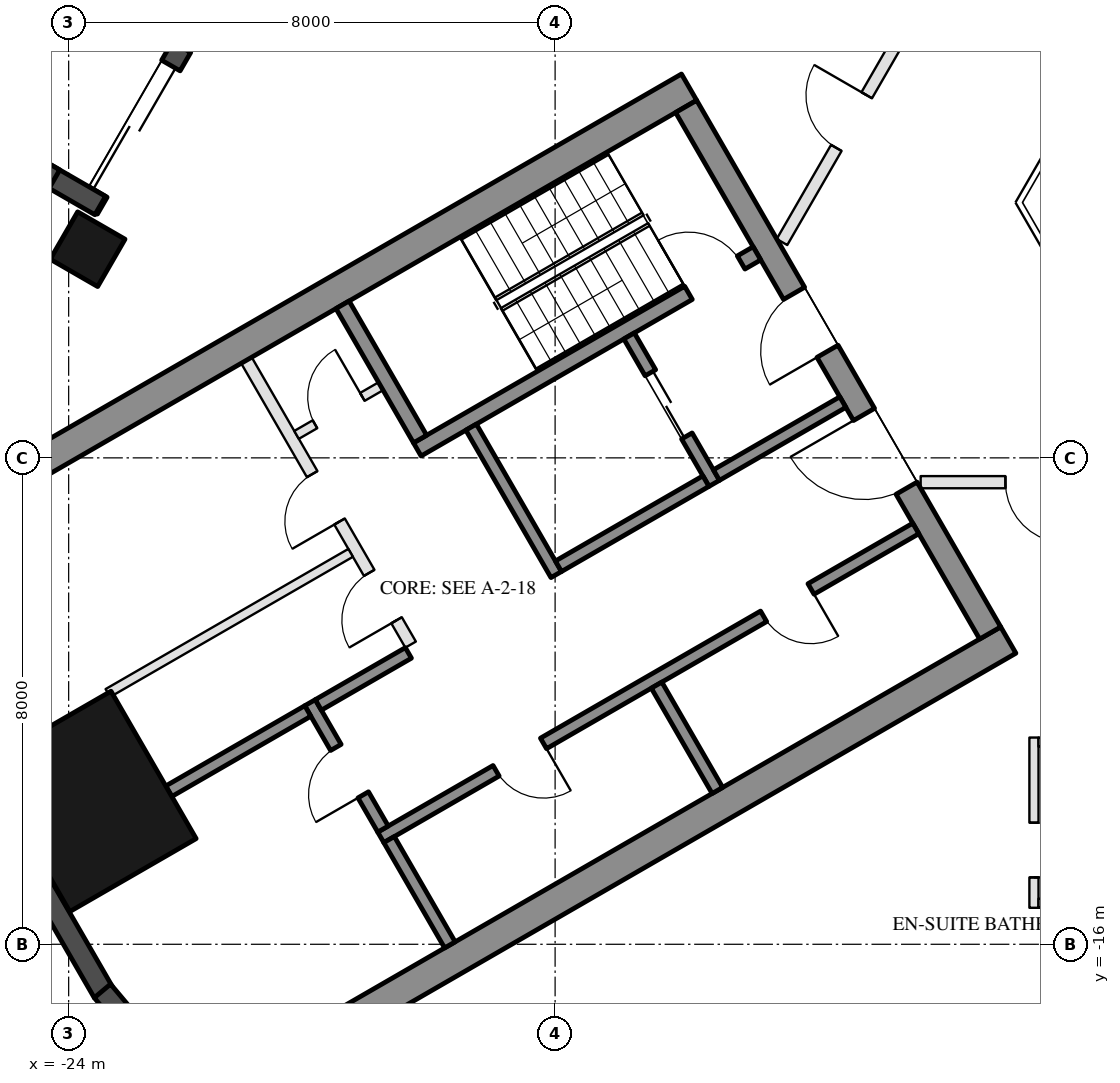
"""IFC4 building model, lengths in metres.
Left out: names, types, materials, properties, quantities, classifications, styles, units other than length and angle.
Written with IfcOpenShell. Run it as: python <this file> out.ifc"""

import sys

from ifc_helpers import new_model, si_unit, direction, frame, frame_2d, origin, origin_2d, place, context, subcontext, project, spatial, rectangle, hollow_rectangle, extrude, element, fill, save


model = new_model("IFC4")
c1 = context("Model", 3, precision=1e-05, world=origin(), true_north=direction((0.0, 1.0)))
c2 = subcontext(c1, "Body", "Model", "MODEL_VIEW")
j1 = project(units=[si_unit("LENGTHUNIT", "METRE"), si_unit("PLANEANGLEUNIT", "RADIAN")], contexts=[c1])
p1 = place(None, origin())
s1 = spatial("IfcSite", under=j1, at=p1, CompositionType="ELEMENT")
p2 = place(p1, origin())
s2 = spatial("IfcBuilding", under=s1, at=p2, CompositionType="ELEMENT")
p3 = place(p2, frame((0.0, 0.0, 87.2)))
s3 = spatial("IfcBuildingStorey", under=s2, at=p3, CompositionType="ELEMENT", Elevation=87.2)
p4 = place(p3, frame((-23.688, -4.568, 0.0), z_axis=(0.0, 0.0, 1.0), x_axis=(0.5, 0.866025403784, 0.0)))
e1 = element("IfcColumn", 1, at=p4, inside=s3, PredefinedType="COLUMN", context=c2, shape_type="SweptSolid", body=[
    extrude(hollow_rectangle(XDim=0.9, YDim=0.9, WallThickness=0.04, at=origin_2d()), origin(), (0.0, 0.0, 1.0), 3.7),
])
p5 = place(p3, frame((-23.643, -13.65, 0.0), z_axis=(0.0, 0.0, 1.0), x_axis=(-0.5, 0.866025403784, 0.0)))
e2 = element("IfcColumn", 2, at=p5, inside=s3, PredefinedType="COLUMN", context=c2, shape_type="SweptSolid", body=[
    extrude(hollow_rectangle(XDim=2.8, YDim=2.4, WallThickness=0.07, at=origin_2d()), origin(), (0.0, 0.0, 1.0), 3.7),
])
p6 = place(p3, frame((-20.309, 1.934, 0.0), z_axis=(0.0, 0.0, 1.0), x_axis=(-0.499992114976, -0.866029956157, 0.0)))
e3 = element("IfcWall", 3, at=p6, inside=s3, PredefinedType="SOLIDWALL", context=c2, shape_type="SweptSolid", body=[
    extrude(rectangle(XDim=6.74, YDim=0.35, at=frame_2d((3.37, 0.0))), origin(), (0.0, 0.0, 1.0), 3.55),
])
p7 = place(p6, frame((4.02, 0.0, 0.0)))
e4 = element("IfcOpeningElement", 4, at=p7, cuts=e3, PredefinedType="OPENING", context=c2, shape_type="SweptSolid", body=[
    extrude(rectangle(XDim=2.4, YDim=2.4, at=frame_2d((1.2, 1.2))), frame((0.0, 0.185, 0.0), z_axis=(0.0, -1.0, 0.0), x_axis=(1.0, 0.0, 0.0)), (0.0, 0.0, 1.0), 0.37),
])
p8 = place(p6, frame((0.77, 0.0, 0.3)))
e5 = element("IfcOpeningElement", 5, at=p8, cuts=e3, PredefinedType="OPENING", context=c2, shape_type="SweptSolid", body=[
    extrude(rectangle(XDim=2.9, YDim=2.65, at=frame_2d((1.45, 1.325))), frame((0.0, 0.185, 0.0), z_axis=(0.0, -1.0, 0.0), x_axis=(1.0, 0.0, 0.0)), (0.0, 0.0, 1.0), 0.37),
])
p9 = place(p3, frame((-23.481, -3.85, 0.0), z_axis=(0.0, 0.0, 1.0), x_axis=(-0.866092288191, 0.499884134912, 0.0)))
e6 = element("IfcWall", 6, at=p9, inside=s3, PredefinedType="SOLIDWALL", context=c2, shape_type="SweptSolid", body=[
    extrude(rectangle(XDim=1.22, YDim=0.35, at=frame_2d((0.61, 0.0))), origin(), (0.0, 0.0, 1.0), 3.55),
])
p10 = place(p3, frame((-24.299, -3.176, 0.0), z_axis=(0.0, 0.0, 1.0), x_axis=(-0.500028278809, -0.866009076391, 0.0)))
e7 = element("IfcWall", 7, at=p10, inside=s3, PredefinedType="SOLIDWALL", context=c2, shape_type="SweptSolid", body=[
    extrude(rectangle(XDim=3.916, YDim=0.35, at=frame_2d((1.958, 0.0))), origin(), (0.0, 0.0, 1.0), 3.55),
])
p11 = place(p10, frame((1.7, 0.0, 0.3)))
e8 = element("IfcOpeningElement", 8, at=p11, cuts=e7, PredefinedType="OPENING", context=c2, shape_type="SweptSolid", body=[
    extrude(rectangle(XDim=1.8, YDim=2.65, at=frame_2d((0.9, 1.325))), frame((0.0, 0.185, 0.0), z_axis=(0.0, -1.0, 0.0), x_axis=(1.0, 0.0, 0.0)), (0.0, 0.0, 1.0), 0.37),
])
p12 = place(p3, frame((-26.257, -11.893, 0.0), z_axis=(0.0, 0.0, 1.0), x_axis=(0.500018773155, -0.866014564827, 0.0)))
e9 = element("IfcWall", 9, at=p12, inside=s3, PredefinedType="SOLIDWALL", context=c2, shape_type="SweptSolid", body=[
    extrude(rectangle(XDim=5.658, YDim=0.35, at=frame_2d((2.829, 0.0))), origin(), (0.0, 0.0, 1.0), 3.55),
])
p13 = place(p3, frame((-23.445, -16.768, 0.0), z_axis=(0.0, 0.0, 1.0), x_axis=(0.642733291068, -0.76609001857, 0.0)))
e10 = element("IfcWall", 10, at=p13, inside=s3, PredefinedType="SOLIDWALL", context=c2, shape_type="SweptSolid", body=[
    extrude(rectangle(XDim=1.91, YDim=0.35, at=frame_2d((0.955, 0.0))), origin(), (0.0, 0.0, 1.0), 3.55),
])
for number, where, z_axis, x_axis in (
    (11, (-13.797, -1.903, 0.0), (0.0, 0.0, 1.0), (-0.866, -0.5, 0.0)),
    (12, (-8.547, -10.997, 0.0), (0.0, 0.0, 1.0), (-0.866, -0.5, 0.0)),
):
    element("IfcWall", number, at=place(p3, frame(where, z_axis=z_axis, x_axis=x_axis)), inside=s3, PredefinedType="SHEAR", context=c2, shape_type="SweptSolid", body=[
        extrude(rectangle(XDim=14.837, YDim=0.5, at=frame_2d((7.418, 0.0))), origin(), (0.0, 0.0, 1.0), 3.5),
    ])
p14 = place(p3, frame((-13.845, -2.22, 0.0), z_axis=(0.0, 0.0, 1.0), x_axis=(0.500004234368, -0.866022959057, 0.0)))
e13 = element("IfcWall", 13, at=p14, inside=s3, PredefinedType="SHEAR", context=c2, shape_type="SweptSolid", body=[
    extrude(rectangle(XDim=10.0, YDim=0.4, at=frame_2d((5.0, 0.0))), origin(), (0.0, 0.0, 1.0), 3.5),
])
p15 = place(p14, frame((3.55, 0.0, 0.0)))
e14 = element("IfcOpeningElement", 14, at=p15, cuts=e13, PredefinedType="OPENING", context=c2, shape_type="SweptSolid", body=[
    extrude(rectangle(XDim=1.1, YDim=2.1, at=frame_2d((0.55, 1.05))), frame((0.0, 0.21, 0.0), z_axis=(0.0, -1.0, 0.0), x_axis=(1.0, 0.0, 0.0)), (0.0, 0.0, 1.0), 0.42),
])
p16 = place(p14, frame((5.85, 0.0, 0.0)))
e15 = element("IfcOpeningElement", 15, at=p16, cuts=e13, PredefinedType="OPENING", context=c2, shape_type="SweptSolid", body=[
    extrude(rectangle(XDim=1.4, YDim=2.1, at=frame_2d((0.7, 1.05))), frame((0.0, 0.21, 0.0), z_axis=(0.0, -1.0, 0.0), x_axis=(1.0, 0.0, 0.0)), (0.0, 0.0, 1.0), 0.42),
])
p17 = place(p3, frame((-12.681, -4.636, 0.0), z_axis=(0.0, 0.0, 1.0), x_axis=(-0.866021702275, -0.500006411147, 0.0)))
e16 = element("IfcWall", 16, at=p17, inside=s3, PredefinedType="SHEAR", context=c2, shape_type="SweptSolid", body=[
    extrude(rectangle(XDim=6.45, YDim=0.25, at=frame_2d((3.225, 0.0))), origin(), (0.0, 0.0, 1.0), 3.5),
])
p18 = place(p17, frame((0.3, 0.0, 0.0)))
e17 = element("IfcOpeningElement", 17, at=p18, cuts=e16, PredefinedType="OPENING", context=c2, shape_type="SweptSolid", body=[
    extrude(rectangle(XDim=1.0, YDim=2.1, at=frame_2d((0.5, 1.05))), frame((0.0, 0.135, 0.0), z_axis=(0.0, -1.0, 0.0), x_axis=(1.0, 0.0, 0.0)), (0.0, 0.0, 1.0), 0.27),
])
p19 = place(p3, frame((-19.496, -5.482, 0.0), z_axis=(0.0, 0.0, 1.0), x_axis=(0.499990435942, -0.866030925526, 0.0)))
e18 = element("IfcWall", 18, at=p19, inside=s3, PredefinedType="SHEAR", context=c2, shape_type="SweptSolid", body=[
    extrude(rectangle(XDim=2.55, YDim=0.25, at=frame_2d((1.275, 0.0))), origin(), (0.0, 0.0, 1.0), 3.5),
])
p20 = place(p3, frame((-17.381, -7.495, 0.0), z_axis=(0.0, 0.0, 1.0), x_axis=(0.500011755427, -0.866018616679, 0.0)))
e19 = element("IfcWall", 19, at=p20, inside=s3, PredefinedType="SHEAR", context=c2, shape_type="SweptSolid", body=[
    extrude(rectangle(XDim=2.8, YDim=0.2, at=frame_2d((1.4, 0.0))), origin(), (0.0, 0.0, 1.0), 3.5),
])
p21 = place(p3, frame((-14.783, -5.995, 0.0), z_axis=(0.0, 0.0, 1.0), x_axis=(0.49994636267, -0.866056369097, 0.0)))
e20 = element("IfcWall", 20, at=p21, inside=s3, PredefinedType="SHEAR", context=c2, shape_type="SweptSolid", body=[
    extrude(rectangle(XDim=2.8, YDim=0.2, at=frame_2d((1.4, 0.0))), origin(), (0.0, 0.0, 1.0), 3.5),
])
p22 = place(p21, frame((0.7, 0.0, 0.0)))
e21 = element("IfcOpeningElement", 21, at=p22, cuts=e20, PredefinedType="OPENING", context=c2, shape_type="SweptSolid", body=[
    extrude(rectangle(XDim=1.2, YDim=2.1, at=frame_2d((0.6, 1.05))), frame((0.0, 0.11, 0.0), z_axis=(0.0, -1.0, 0.0), x_axis=(1.0, 0.0, 0.0)), (0.0, 0.0, 1.0), 0.22),
])
p23 = place(p3, frame((-13.52, -8.383, 0.0), z_axis=(0.0, 0.0, 1.0), x_axis=(-0.866034573852, -0.49998411664, 0.0)))
e22 = element("IfcWall", 22, at=p23, inside=s3, PredefinedType="SHEAR", context=c2, shape_type="SweptSolid", body=[
    extrude(rectangle(XDim=2.8, YDim=0.2, at=frame_2d((1.4, 0.0))), origin(), (0.0, 0.0, 1.0), 3.5),
])
p24 = place(p3, frame((-11.268, -7.083, 0.0), z_axis=(0.0, 0.0, 1.0), x_axis=(-0.866050077142, -0.499957262057, 0.0)))
e23 = element("IfcWall", 23, at=p24, inside=s3, PredefinedType="SHEAR", context=c2, shape_type="SweptSolid", body=[
    extrude(rectangle(XDim=2.4, YDim=0.2, at=frame_2d((1.2, 0.0))), origin(), (0.0, 0.0, 1.0), 3.5),
])
p25 = place(p3, frame((-10.068, -9.162, 0.0), z_axis=(0.0, 0.0, 1.0), x_axis=(-0.866032725843, -0.499987317609, 0.0)))
e24 = element("IfcWall", 24, at=p25, inside=s3, PredefinedType="SHEAR", context=c2, shape_type="SweptSolid", body=[
    extrude(rectangle(XDim=10.16, YDim=0.2, at=frame_2d((5.08, 0.0))), origin(), (0.0, 0.0, 1.0), 3.5),
])
p26 = place(p25, frame((1.99, 0.0, 0.0)))
e25 = element("IfcOpeningElement", 25, at=p26, cuts=e24, PredefinedType="OPENING", context=c2, shape_type="SweptSolid", body=[
    extrude(rectangle(XDim=0.9, YDim=2.1, at=frame_2d((0.45, 1.05))), frame((0.0, 0.11, 0.0), z_axis=(0.0, -1.0, 0.0), x_axis=(1.0, 0.0, 0.0)), (0.0, 0.0, 1.0), 0.22),
])
p27 = place(p25, frame((7.07, 0.0, 0.0)))
e26 = element("IfcOpeningElement", 26, at=p27, cuts=e24, PredefinedType="OPENING", context=c2, shape_type="SweptSolid", body=[
    extrude(rectangle(XDim=0.9, YDim=2.1, at=frame_2d((0.45, 1.05))), frame((0.0, 0.11, 0.0), z_axis=(0.0, -1.0, 0.0), x_axis=(1.0, 0.0, 0.0)), (0.0, 0.0, 1.0), 0.22),
])
p28 = place(p3, frame((-20.031, -12.026, 0.0), z_axis=(0.0, 0.0, 1.0), x_axis=(0.500033551112, -0.866006032174, 0.0)))
e27 = element("IfcWall", 27, at=p28, inside=s3, PredefinedType="SHEAR", context=c2, shape_type="SweptSolid", body=[
    extrude(rectangle(XDim=2.4, YDim=0.2, at=frame_2d((1.2, 0.0))), origin(), (0.0, 0.0, 1.0), 3.5),
])
p29 = place(p28, frame((0.85, 0.0, 0.0)))
e28 = element("IfcOpeningElement", 28, at=p29, cuts=e27, PredefinedType="OPENING", context=c2, shape_type="SweptSolid", body=[
    extrude(rectangle(XDim=0.9, YDim=2.1, at=frame_2d((0.45, 1.05))), frame((0.0, 0.11, 0.0), z_axis=(0.0, -1.0, 0.0), x_axis=(1.0, 0.0, 0.0)), (0.0, 0.0, 1.0), 0.22),
])
p30 = place(p3, frame((-18.413, -11.208, 0.0), z_axis=(0.0, 0.0, 1.0), x_axis=(-0.866038183914, -0.499977863513, 0.0)))
e29 = element("IfcWall", 29, at=p30, inside=s3, PredefinedType="SHEAR", context=c2, shape_type="SweptSolid", body=[
    extrude(rectangle(XDim=1.71, YDim=0.2, at=frame_2d((0.855, 0.0))), origin(), (0.0, 0.0, 1.0), 3.5),
])
for number, where, z_axis, x_axis in (
    (30, (-14.331, -11.738, 0.0), (0.0, 0.0, 1.0), (0.5, -0.866, 0.0)),
    (31, (-18.73, -14.278, 0.0), (0.0, 0.0, 1.0), (0.5, -0.866, 0.0)),
):
    element("IfcWall", number, at=place(p3, frame(where, z_axis=z_axis, x_axis=x_axis)), inside=s3, PredefinedType="SHEAR", context=c2, shape_type="SweptSolid", body=[
        extrude(rectangle(XDim=2.0, YDim=0.2, at=frame_2d((1.0, 0.0))), origin(), (0.0, 0.0, 1.0), 3.5),
    ])
p31 = place(p3, frame((-20.067, -12.163, 0.0), z_axis=(0.0, 0.0, 1.0), x_axis=(-0.866060851709, -0.499938597367, 0.0)))
e32 = element("IfcWall", 32, at=p31, inside=s3, PredefinedType="SHEAR", context=c2, shape_type="SweptSolid", body=[
    extrude(rectangle(XDim=2.64, YDim=0.2, at=frame_2d((1.32, 0.0))), origin(), (0.0, 0.0, 1.0), 3.5),
])
p32 = place(p3, frame((-21.076, -6.395, 0.0), z_axis=(0.0, 0.0, 1.0), x_axis=(0.50001468107, -0.866016927499, 0.0)))
e33 = element("IfcWall", 33, at=p32, inside=s3, PredefinedType="PARTITIONING", context=c2, shape_type="SweptSolid", body=[
    extrude(rectangle(XDim=5.4, YDim=0.2, at=frame_2d((2.7, 0.0))), origin(), (0.0, 0.0, 1.0), 3.5),
])
p33 = place(p32, frame((2.163, 0.0, 0.0)))
e34 = element("IfcOpeningElement", 34, at=p33, cuts=e33, PredefinedType="OPENING", context=c2, shape_type="SweptSolid", body=[
    extrude(rectangle(XDim=0.9, YDim=2.1, at=frame_2d((0.45, 1.05))), frame((0.0, 0.11, 0.0), z_axis=(0.0, -1.0, 0.0), x_axis=(1.0, 0.0, 0.0)), (0.0, 0.0, 1.0), 0.22),
])
p34 = place(p32, frame((4.038, 0.0, 0.0)))
e35 = element("IfcOpeningElement", 35, at=p34, cuts=e33, PredefinedType="OPENING", context=c2, shape_type="SweptSolid", body=[
    extrude(rectangle(XDim=0.9, YDim=2.1, at=frame_2d((0.45, 1.05))), frame((0.0, 0.11, 0.0), z_axis=(0.0, -1.0, 0.0), x_axis=(1.0, 0.0, 0.0)), (0.0, 0.0, 1.0), 0.22),
])
p35 = place(p3, frame((-18.866, -6.822, 0.0), z_axis=(0.0, 0.0, 1.0), x_axis=(-0.866028054938, -0.499995408039, 0.0)))
e36 = element("IfcWall", 36, at=p35, inside=s3, PredefinedType="PARTITIONING", context=c2, shape_type="SweptSolid", body=[
    extrude(rectangle(XDim=1.6, YDim=0.15, at=frame_2d((0.8, 0.0))), origin(), (0.0, 0.0, 1.0), 3.5),
])
p36 = place(p35, frame((0.35, 0.0, 0.0)))
e37 = element("IfcOpeningElement", 37, at=p36, cuts=e36, PredefinedType="OPENING", context=c2, shape_type="SweptSolid", body=[
    extrude(rectangle(XDim=0.9, YDim=2.1, at=frame_2d((0.45, 1.05))), frame((0.0, 0.085, 0.0), z_axis=(0.0, -1.0, 0.0), x_axis=(1.0, 0.0, 0.0)), (0.0, 0.0, 1.0), 0.17),
])
p37 = place(p3, frame((-19.363, -9.562, 0.0), z_axis=(0.0, 0.0, 1.0), x_axis=(-0.86601185002, -0.500023475074, 0.0)))
e38 = element("IfcWall", 38, at=p37, inside=s3, PredefinedType="PARTITIONING", context=c2, shape_type="SweptSolid", body=[
    extrude(rectangle(XDim=4.61, YDim=0.15, at=frame_2d((2.305, 0.0))), origin(), (0.0, 0.0, 1.0), 3.5),
])
p38 = place(p3, frame((-6.2, -8.4, 0.0), z_axis=(0.0, 0.0, 1.0), x_axis=(-1.0, 0.0, 0.0)))
e39 = element("IfcWall", 39, at=p38, inside=s3, PredefinedType="PARTITIONING", context=c2, shape_type="SweptSolid", body=[
    extrude(rectangle(XDim=3.788, YDim=0.2, at=frame_2d((1.894, 0.0))), origin(), (0.0, 0.0, 1.0), 2.95),
])
p39 = place(p38, frame((1.394, 0.0, 0.0)))
e40 = element("IfcOpeningElement", 40, at=p39, cuts=e39, PredefinedType="OPENING", context=c2, shape_type="SweptSolid", body=[
    extrude(rectangle(XDim=1.0, YDim=2.1, at=frame_2d((0.5, 1.05))), frame((0.0, 0.11, 0.0), z_axis=(0.0, -1.0, 0.0), x_axis=(1.0, 0.0, 0.0)), (0.0, 0.0, 1.0), 0.22),
])
p40 = place(p3, frame((-8.125, -12.6, 0.0), z_axis=(0.0, 0.0, 1.0), x_axis=(0.0, -1.0, 0.0)))
e41 = element("IfcWall", 41, at=p40, inside=s3, PredefinedType="PARTITIONING", context=c2, shape_type="SweptSolid", body=[
    extrude(rectangle(XDim=2.8, YDim=0.15, at=frame_2d((1.4, 0.0))), origin(), (0.0, 0.0, 1.0), 3.55),
])
p41 = place(p40, frame((1.4, 0.0, 0.0)))
e42 = element("IfcOpeningElement", 42, at=p41, cuts=e41, PredefinedType="OPENING", context=c2, shape_type="SweptSolid", body=[
    extrude(rectangle(XDim=0.9, YDim=2.1, at=frame_2d((0.45, 1.05))), frame((0.0, 0.085, 0.0), z_axis=(0.0, -1.0, 0.0), x_axis=(1.0, 0.0, 0.0)), (0.0, 0.0, 1.0), 0.17),
])
for number, where, z_axis, x_axis in (
    (43, (-8.05, -15.325, 0.0), (0.0, 0.0, 1.0), (1.0, 0.0, 0.0)),
    (44, (-8.05, -12.675, 0.0), (0.0, 0.0, 1.0), (1.0, 0.0, 0.0)),
):
    element("IfcWall", number, at=place(p3, frame(where, z_axis=z_axis, x_axis=x_axis)), inside=s3, PredefinedType="PARTITIONING", context=c2, shape_type="SweptSolid", body=[
        extrude(rectangle(XDim=1.85, YDim=0.15, at=frame_2d((0.925, 0.0))), origin(), (0.0, 0.0, 1.0), 2.95),
    ])
p42 = place(p3, frame((-12.269, -4.45, 0.0), z_axis=(0.0, 0.0, 1.0), x_axis=(0.500030411023, 0.86600784526, 0.0)))
e45 = element("IfcWall", 45, at=p42, inside=s3, PredefinedType="PARTITIONING", context=c2, shape_type="SweptSolid", body=[
    extrude(rectangle(XDim=4.575, YDim=0.2, at=frame_2d((2.288, 0.0))), origin(), (0.0, 0.0, 1.0), 2.95),
])
p43 = place(p42, frame((1.787, 0.0, 0.0)))
e46 = element("IfcOpeningElement", 46, at=p43, cuts=e45, PredefinedType="OPENING", context=c2, shape_type="SweptSolid", body=[
    extrude(rectangle(XDim=1.0, YDim=2.1, at=frame_2d((0.5, 1.05))), frame((0.0, 0.11, 0.0), z_axis=(0.0, -1.0, 0.0), x_axis=(1.0, 0.0, 0.0)), (0.0, 0.0, 1.0), 0.22),
])
p44 = place(p7, frame((2.4, 0.0, 0.0), z_axis=(0.0, 0.0, 1.0), x_axis=(-1.0, 0.0, 0.0)))
e47 = element("IfcDoor", 47, at=p44, inside=s3, OperationType="SLIDING_TO_LEFT", PredefinedType="DOOR", context=c2, shape_type="SweptSolid", body=[
    extrude(rectangle(XDim=2.4, YDim=2.4, at=frame_2d((1.2, 1.2))), frame((0.0, 0.025, 0.0), z_axis=(0.0, -1.0, 0.0), x_axis=(1.0, 0.0, 0.0)), (0.0, 0.0, 1.0), 0.05),
])
fill(e4, e47)
p45 = place(p22, origin())
e48 = element("IfcDoor", 48, at=p45, inside=s3, OperationType="DOUBLE_DOOR_SLIDING", PredefinedType="DOOR", context=c2, shape_type="SweptSolid", body=[
    extrude(rectangle(XDim=1.2, YDim=2.1, at=frame_2d((0.6, 1.05))), frame((0.0, 0.025, 0.0), z_axis=(0.0, -1.0, 0.0), x_axis=(1.0, 0.0, 0.0)), (0.0, 0.0, 1.0), 0.05),
])
fill(e21, e48)
p46 = place(p36, frame((0.9, 0.0, 0.0), z_axis=(0.0, 0.0, 1.0), x_axis=(-1.0, 0.0, 0.0)))
e49 = element("IfcDoor", 49, at=p46, inside=s3, OperationType="SINGLE_SWING_RIGHT", PredefinedType="DOOR", context=c2, shape_type="SweptSolid", body=[
    extrude(rectangle(XDim=0.9, YDim=2.1, at=frame_2d((0.45, 1.05))), frame((0.0, 0.025, 0.0), z_axis=(0.0, -1.0, 0.0), x_axis=(1.0, 0.0, 0.0)), (0.0, 0.0, 1.0), 0.05),
])
fill(e37, e49)
p47 = place(p26, origin())
e50 = element("IfcDoor", 50, at=p47, inside=s3, OperationType="SINGLE_SWING_LEFT", PredefinedType="DOOR", context=c2, shape_type="SweptSolid", body=[
    extrude(rectangle(XDim=0.9, YDim=2.1, at=frame_2d((0.45, 1.05))), frame((0.0, 0.025, 0.0), z_axis=(0.0, -1.0, 0.0), x_axis=(1.0, 0.0, 0.0)), (0.0, 0.0, 1.0), 0.05),
])
fill(e25, e50)
p48 = place(p27, origin())
e51 = element("IfcDoor", 51, at=p48, inside=s3, OperationType="SINGLE_SWING_LEFT", PredefinedType="DOOR", context=c2, shape_type="SweptSolid", body=[
    extrude(rectangle(XDim=0.9, YDim=2.1, at=frame_2d((0.45, 1.05))), frame((0.0, 0.025, 0.0), z_axis=(0.0, -1.0, 0.0), x_axis=(1.0, 0.0, 0.0)), (0.0, 0.0, 1.0), 0.05),
])
fill(e26, e51)
p49 = place(p29, frame((0.9, 0.0, 0.0), z_axis=(0.0, 0.0, 1.0), x_axis=(-1.0, 0.0, 0.0)))
e52 = element("IfcDoor", 52, at=p49, inside=s3, OperationType="SINGLE_SWING_LEFT", PredefinedType="DOOR", context=c2, shape_type="SweptSolid", body=[
    extrude(rectangle(XDim=0.9, YDim=2.1, at=frame_2d((0.45, 1.05))), frame((0.0, 0.025, 0.0), z_axis=(0.0, -1.0, 0.0), x_axis=(1.0, 0.0, 0.0)), (0.0, 0.0, 1.0), 0.05),
])
fill(e28, e52)
p50 = place(p33, frame((0.9, 0.0, 0.0), z_axis=(0.0, 0.0, 1.0), x_axis=(-1.0, 0.0, 0.0)))
e53 = element("IfcDoor", 53, at=p50, inside=s3, OperationType="SINGLE_SWING_LEFT", PredefinedType="DOOR", context=c2, shape_type="SweptSolid", body=[
    extrude(rectangle(XDim=0.9, YDim=2.1, at=frame_2d((0.45, 1.05))), frame((0.0, 0.025, 0.0), z_axis=(0.0, -1.0, 0.0), x_axis=(1.0, 0.0, 0.0)), (0.0, 0.0, 1.0), 0.05),
])
fill(e34, e53)
p51 = place(p34, frame((0.9, 0.0, 0.0), z_axis=(0.0, 0.0, 1.0), x_axis=(-1.0, 0.0, 0.0)))
e54 = element("IfcDoor", 54, at=p51, inside=s3, OperationType="SINGLE_SWING_LEFT", PredefinedType="DOOR", context=c2, shape_type="SweptSolid", body=[
    extrude(rectangle(XDim=0.9, YDim=2.1, at=frame_2d((0.45, 1.05))), frame((0.0, 0.025, 0.0), z_axis=(0.0, -1.0, 0.0), x_axis=(1.0, 0.0, 0.0)), (0.0, 0.0, 1.0), 0.05),
])
fill(e35, e54)
p52 = place(p15, frame((1.1, 0.0, 0.0), z_axis=(0.0, 0.0, 1.0), x_axis=(-1.0, 0.0, 0.0)))
e55 = element("IfcDoor", 55, at=p52, inside=s3, OperationType="SINGLE_SWING_LEFT", PredefinedType="DOOR", context=c2, shape_type="SweptSolid", body=[
    extrude(rectangle(XDim=1.1, YDim=2.1, at=frame_2d((0.55, 1.05))), frame((0.0, 0.025, 0.0), z_axis=(0.0, -1.0, 0.0), x_axis=(1.0, 0.0, 0.0)), (0.0, 0.0, 1.0), 0.05),
])
fill(e14, e55)
p53 = place(p16, frame((1.4, 0.0, 0.0), z_axis=(0.0, 0.0, 1.0), x_axis=(-1.0, 0.0, 0.0)))
e56 = element("IfcDoor", 56, at=p53, inside=s3, OperationType="DOUBLE_DOOR_SINGLE_SWING", PredefinedType="DOOR", context=c2, shape_type="SweptSolid", body=[
    extrude(rectangle(XDim=1.4, YDim=2.1, at=frame_2d((0.7, 1.05))), frame((0.0, 0.025, 0.0), z_axis=(0.0, -1.0, 0.0), x_axis=(1.0, 0.0, 0.0)), (0.0, 0.0, 1.0), 0.05),
])
fill(e15, e56)
p54 = place(p18, frame((1.0, 0.0, 0.0), z_axis=(0.0, 0.0, 1.0), x_axis=(-1.0, 0.0, 0.0)))
e57 = element("IfcDoor", 57, at=p54, inside=s3, OperationType="SINGLE_SWING_LEFT", PredefinedType="DOOR", context=c2, shape_type="SweptSolid", body=[
    extrude(rectangle(XDim=1.0, YDim=2.1, at=frame_2d((0.5, 1.05))), frame((0.0, 0.025, 0.0), z_axis=(0.0, -1.0, 0.0), x_axis=(1.0, 0.0, 0.0)), (0.0, 0.0, 1.0), 0.05),
])
fill(e17, e57)
p55 = place(p41, origin())
e58 = element("IfcDoor", 58, at=p55, inside=s3, OperationType="SINGLE_SWING_RIGHT", PredefinedType="DOOR", context=c2, shape_type="SweptSolid", body=[
    extrude(rectangle(XDim=0.9, YDim=2.1, at=frame_2d((0.45, 1.05))), frame((0.0, 0.025, 0.0), z_axis=(0.0, -1.0, 0.0), x_axis=(1.0, 0.0, 0.0)), (0.0, 0.0, 1.0), 0.05),
])
fill(e42, e58)
p56 = place(p39, origin())
e59 = element("IfcDoor", 59, at=p56, inside=s3, OperationType="SINGLE_SWING_LEFT", PredefinedType="DOOR", context=c2, shape_type="SweptSolid", body=[
    extrude(rectangle(XDim=1.0, YDim=2.1, at=frame_2d((0.5, 1.05))), frame((0.0, 0.025, 0.0), z_axis=(0.0, -1.0, 0.0), x_axis=(1.0, 0.0, 0.0)), (0.0, 0.0, 1.0), 0.05),
])
fill(e40, e59)
p57 = place(p43, origin())
e60 = element("IfcDoor", 60, at=p57, inside=s3, OperationType="SINGLE_SWING_RIGHT", PredefinedType="DOOR", context=c2, shape_type="SweptSolid", body=[
    extrude(rectangle(XDim=1.0, YDim=2.1, at=frame_2d((0.5, 1.05))), frame((0.0, 0.025, 0.0), z_axis=(0.0, -1.0, 0.0), x_axis=(1.0, 0.0, 0.0)), (0.0, 0.0, 1.0), 0.05),
])
fill(e46, e60)
save(model, sys.argv[1])
